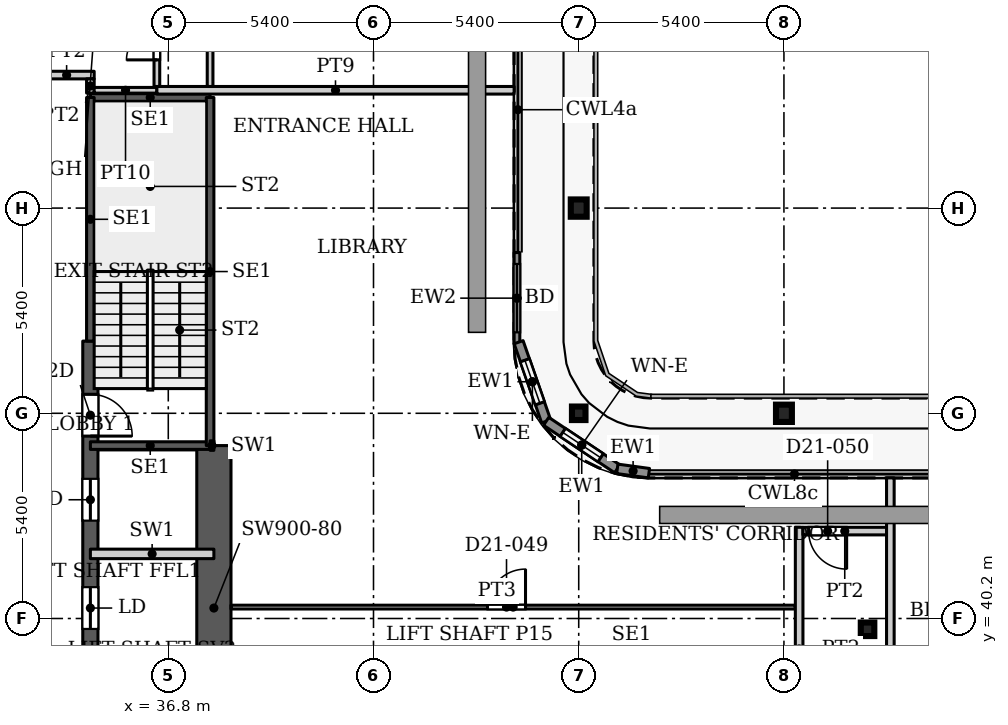
"""IFC4 building model, lengths in metres.
Left out: names, types, materials, properties, quantities, classifications, styles, units other than length and angle.
Written with IfcOpenShell. Run it as: python <this file> out.ifc"""

import sys

from ifc_helpers import new_model, si_unit, direction, frame, frame_2d, origin, origin_2d, place, context, subcontext, project, spatial, rectangle, hollow_rectangle, i_section, extrude, source, transform, mapped, element, fill, save


model = new_model("IFC4")
c1 = context("Model", 3, precision=1e-05, world=origin(), true_north=direction((0.0, 1.0)))
c2 = subcontext(c1, "Body", "Model", "MODEL_VIEW")
j1 = project(units=[si_unit("LENGTHUNIT", "METRE"), si_unit("PLANEANGLEUNIT", "RADIAN")], contexts=[c1])
p1 = place(None, origin())
s1 = spatial("IfcSite", under=j1, at=p1, CompositionType="ELEMENT")
p2 = place(p1, origin())
s2 = spatial("IfcBuilding", under=s1, at=p2, CompositionType="ELEMENT")
p3 = place(p2, frame((0.0, 0.0, 94.1)))
s3 = spatial("IfcBuildingStorey", under=s2, at=p3, CompositionType="ELEMENT", Elevation=94.1)
for number, where, z_axis, x_axis in (
    (1, (53.0, 45.6, 0.0), (0.0, 0.0, 1.0), (1.0, 0.0, 0.0)),
    (2, (47.6, 51.0, 0.0), (0.0, 0.0, 1.0), (1.0, 0.0, 0.0)),
):
    element("IfcColumn", number, at=place(p3, frame(where, z_axis=z_axis, x_axis=x_axis)), inside=s3, PredefinedType="COLUMN", context=c2, shape_type="SweptSolid", body=[
        extrude(i_section(OverallWidth=0.418, OverallDepth=0.455, WebThickness=0.042, FlangeThickness=0.068, FilletRadius=0.014, at=origin_2d()), origin(), (0.0, 0.0, 1.0), 3.9),
    ])
for number, where, z_axis, x_axis in (
    (3, (55.2, 39.916, 0.0), (0.0, 0.0, 1.0), (1.0, 0.0, 0.0)),
    (4, (47.6, 45.6, 0.0), (0.0, 0.0, 1.0), (1.0, 0.0, 0.0)),
):
    element("IfcColumn", number, at=place(p3, frame(where, z_axis=z_axis, x_axis=x_axis)), inside=s3, PredefinedType="COLUMN", context=c2, shape_type="SweptSolid", body=[
        extrude(hollow_rectangle(XDim=0.356, YDim=0.356, WallThickness=0.016, InnerFilletRadius=0.016, OuterFilletRadius=0.032, at=origin_2d()), origin(), (0.0, 0.0, 1.0), 3.9),
    ])
p4 = place(p3, frame((34.75, 29.05, 0.0), z_axis=(0.0, 0.0, 1.0), x_axis=(0.0, 1.0, 0.0)))
e5 = element("IfcWall", 5, at=p4, inside=s3, PredefinedType="SHEAR", context=c2, shape_type="SweptSolid", body=[
    extrude(rectangle(XDim=18.45, YDim=0.4, at=frame_2d((9.225, 0.0))), origin(), (0.0, 0.0, 1.0), 3.9),
])
p5 = place(p4, frame((8.025, 0.0, 0.0)))
e6 = element("IfcOpeningElement", 6, at=p5, cuts=e5, PredefinedType="OPENING", context=c2, shape_type="SweptSolid", body=[
    extrude(rectangle(XDim=1.1, YDim=2.2, at=frame_2d((0.55, 1.1))), frame((0.0, 0.21, 0.0), z_axis=(0.0, -1.0, 0.0), x_axis=(1.0, 0.0, 0.0)), (0.0, 0.0, 1.0), 0.42),
])
p6 = place(p4, frame((10.875, 0.0, 0.0)))
e7 = element("IfcOpeningElement", 7, at=p6, cuts=e5, PredefinedType="OPENING", context=c2, shape_type="SweptSolid", body=[
    extrude(rectangle(XDim=1.1, YDim=2.2, at=frame_2d((0.55, 1.1))), frame((0.0, 0.21, 0.0), z_axis=(0.0, -1.0, 0.0), x_axis=(1.0, 0.0, 0.0)), (0.0, 0.0, 1.0), 0.42),
])
p7 = place(p4, frame((13.725, 0.0, 0.0)))
e8 = element("IfcOpeningElement", 8, at=p7, cuts=e5, PredefinedType="OPENING", context=c2, shape_type="SweptSolid", body=[
    extrude(rectangle(XDim=1.1, YDim=2.2, at=frame_2d((0.55, 1.1))), frame((0.0, 0.21, 0.0), z_axis=(0.0, -1.0, 0.0), x_axis=(1.0, 0.0, 0.0)), (0.0, 0.0, 1.0), 0.42),
])
p8 = place(p4, frame((15.95, 0.0, 0.0)))
e9 = element("IfcOpeningElement", 9, at=p8, cuts=e5, PredefinedType="OPENING", context=c2, shape_type="SweptSolid", body=[
    extrude(rectangle(XDim=1.1, YDim=2.2, at=frame_2d((0.55, 1.1))), frame((0.0, 0.21, 0.0), z_axis=(0.0, -1.0, 0.0), x_axis=(1.0, 0.0, 0.0)), (0.0, 0.0, 1.0), 0.42),
])
p9 = place(p3, frame((38.0, 36.2, 0.0), z_axis=(0.0, 0.0, 1.0), x_axis=(0.0, 1.0, 0.0)))
e10 = element("IfcWall", 10, at=p9, inside=s3, PredefinedType="SHEAR", context=c2, shape_type="SweptSolid", body=[
    extrude(rectangle(XDim=8.55, YDim=0.9, at=frame_2d((4.275, 0.0))), origin(), (0.0, 0.0, 1.0), 3.9),
])
p10 = place(p3, frame((45.975, 49.83, 0.0), z_axis=(0.0, 0.0, 1.0), x_axis=(0.0, -1.0, 0.0)))
e11 = element("IfcWall", 11, at=p10, inside=s3, PredefinedType="SOLIDWALL", context=c2, shape_type="SweptSolid", body=[
    extrude(rectangle(XDim=2.4, YDim=0.15, at=frame_2d((1.2, 0.0))), origin(), (0.0, 0.0, 1.0), 3.75),
])
p11 = place(p10, frame((0.3, 0.0, 0.0)))
e12 = element("IfcOpeningElement", 12, at=p11, cuts=e11, PredefinedType="OPENING", context=c2, shape_type="SweptSolid", body=[
    extrude(rectangle(XDim=1.8, YDim=2.4, at=frame_2d((0.9, 1.2))), frame((0.0, 0.085, 0.0), z_axis=(0.0, -1.0, 0.0), x_axis=(1.0, 0.0, 0.0)), (0.0, 0.0, 1.0), 0.17),
])
p12 = place(p3, frame((46.018, 47.471, 0.0), z_axis=(0.0, 0.0, 1.0), x_axis=(0.328791208903, -0.944402637093, 0.0)))
e13 = element("IfcWall", 13, at=p12, inside=s3, PredefinedType="SOLIDWALL", context=c2, shape_type="SweptSolid", body=[
    extrude(rectangle(XDim=2.205, YDim=0.25, at=frame_2d((1.102, 0.0))), origin(), (0.0, 0.0, 1.0), 3.75),
])
p13 = place(p12, frame((0.503, 0.0, 0.6)))
e14 = element("IfcOpeningElement", 14, at=p13, cuts=e13, PredefinedType="OPENING", context=c2, shape_type="SweptSolid", body=[
    extrude(rectangle(XDim=1.2, YDim=2.1, at=frame_2d((0.6, 1.05))), frame((0.0, 0.135, 0.0), z_axis=(0.0, -1.0, 0.0), x_axis=(1.0, 0.0, 0.0)), (0.0, 0.0, 1.0), 0.27),
])
p14 = place(p3, frame((46.743, 45.389, 0.0), z_axis=(0.0, 0.0, 1.0), x_axis=(0.831449265529, -0.555600682912, 0.0)))
e15 = element("IfcWall", 15, at=p14, inside=s3, PredefinedType="SOLIDWALL", context=c2, shape_type="SweptSolid", body=[
    extrude(rectangle(XDim=2.251, YDim=0.25, at=frame_2d((1.126, 0.0))), origin(), (0.0, 0.0, 1.0), 3.75),
])
p15 = place(p14, frame((0.525, 0.0, 0.6)))
e16 = element("IfcOpeningElement", 16, at=p15, cuts=e15, PredefinedType="OPENING", context=c2, shape_type="SweptSolid", body=[
    extrude(rectangle(XDim=1.2, YDim=2.1, at=frame_2d((0.6, 1.05))), frame((0.0, 0.135, 0.0), z_axis=(0.0, -1.0, 0.0), x_axis=(1.0, 0.0, 0.0)), (0.0, 0.0, 1.0), 0.27),
])
p16 = place(p3, frame((48.615, 44.138, 0.0), z_axis=(0.0, 0.0, 1.0), x_axis=(0.990741504246, -0.135761819977, 0.0)))
e17 = element("IfcWall", 17, at=p16, inside=s3, PredefinedType="SOLIDWALL", context=c2, shape_type="SweptSolid", body=[
    extrude(rectangle(XDim=0.84, YDim=0.25, at=frame_2d((0.42, 0.0))), origin(), (0.0, 0.0, 1.0), 3.75),
])
for number, where, z_axis, x_axis in (
    (18, (34.75, 44.75, 0.0), (0.0, 0.0, 1.0), (1.0, 0.0, 0.0)),
    (19, (34.75, 53.91, 0.0), (0.0, 0.0, 1.0), (1.0, 0.0, 0.0)),
):
    element("IfcWall", number, at=place(p3, frame(where, z_axis=z_axis, x_axis=x_axis)), inside=s3, PredefinedType="SHEAR", context=c2, shape_type="SweptSolid", body=[
        extrude(rectangle(XDim=3.15, YDim=0.2, at=frame_2d((1.575, 0.0))), origin(), (0.0, 0.0, 1.0), 3.9),
    ])
p17 = place(p3, frame((34.75, 47.5, 0.0), z_axis=(0.0, 0.0, 1.0), x_axis=(0.0, 1.0, 0.0)))
e20 = element("IfcWall", 20, at=p17, inside=s3, PredefinedType="SHEAR", context=c2, shape_type="SweptSolid", body=[
    extrude(rectangle(XDim=6.41, YDim=0.2, at=frame_2d((3.205, 0.0))), origin(), (0.0, 0.0, 1.0), 3.9),
])
p18 = place(p3, frame((37.9, 44.75, 0.0), z_axis=(0.0, 0.0, 1.0), x_axis=(0.0, 1.0, 0.0)))
e21 = element("IfcWall", 21, at=p18, inside=s3, PredefinedType="SHEAR", context=c2, shape_type="SweptSolid", body=[
    extrude(rectangle(XDim=9.16, YDim=0.2, at=frame_2d((4.58, 0.0))), origin(), (0.0, 0.0, 1.0), 3.9),
])
p19 = place(p3, frame((34.75, 41.9, 0.0), z_axis=(0.0, 0.0, 1.0), x_axis=(1.0, 0.0, 0.0)))
e22 = element("IfcWall", 22, at=p19, inside=s3, PredefinedType="PARTITIONING", context=c2, shape_type="SweptSolid", body=[
    extrude(rectangle(XDim=3.25, YDim=0.25, at=frame_2d((1.625, 0.0))), origin(), (0.0, 0.0, 1.0), 3.9),
])
p20 = place(p3, frame((37.9, 44.75, 0.0), z_axis=(0.0, 0.0, 1.0), x_axis=(1.0, 0.0, 0.0)))
e23 = element("IfcWall", 23, at=p20, inside=s3, PredefinedType="PARTITIONING", context=c2, shape_type="SweptSolid", body=[
    extrude(rectangle(XDim=0.1, YDim=0.25, at=frame_2d((0.05, 0.0))), origin(), (0.0, 0.0, 1.0), 3.9),
])
p21 = place(p3, frame((33.4, 54.5, 0.0), z_axis=(0.0, 0.0, 1.0), x_axis=(1.0, 0.0, 0.0)))
e24 = element("IfcWall", 24, at=p21, inside=s3, PredefinedType="PARTITIONING", context=c2, shape_type="SweptSolid", body=[
    extrude(rectangle(XDim=1.45, YDim=0.2, at=frame_2d((0.725, 0.0))), origin(), (0.0, 0.0, 1.0), 3.6),
])
p22 = place(p3, frame((34.75, 54.025, 0.0), z_axis=(0.0, 0.0, 1.0), x_axis=(0.0, 1.0, 0.0)))
e25 = element("IfcWall", 25, at=p22, inside=s3, PredefinedType="PARTITIONING", context=c2, shape_type="SweptSolid", body=[
    extrude(rectangle(XDim=0.375, YDim=0.2, at=frame_2d((0.188, 0.0))), origin(), (0.0, 0.0, 1.0), 3.6),
])
p23 = place(p3, frame((34.85, 54.1, 0.0), z_axis=(0.0, 0.0, 1.0), x_axis=(1.0, 0.0, 0.0)))
e26 = element("IfcWall", 26, at=p23, inside=s3, PredefinedType="PARTITIONING", context=c2, shape_type="SweptSolid", body=[
    extrude(rectangle(XDim=1.65, YDim=0.15, at=frame_2d((0.825, 0.0))), origin(), (0.0, 0.0, 1.0), 3.6),
])
p24 = place(p3, frame((36.5, 54.1, 0.0), z_axis=(0.0, 0.0, 1.0), x_axis=(1.0, 0.0, 0.0)))
e27 = element("IfcWall", 27, at=p24, inside=s3, PredefinedType="PARTITIONING", context=c2, shape_type="SweptSolid", body=[
    extrude(rectangle(XDim=9.4, YDim=0.2, at=frame_2d((4.7, 0.0))), origin(), (0.0, 0.0, 1.0), 3.6),
])
p25 = place(p3, frame((36.5, 54.2, 0.0), z_axis=(0.0, 0.0, 1.0), x_axis=(0.0, 1.0, 0.0)))
e28 = element("IfcWall", 28, at=p25, inside=s3, PredefinedType="PARTITIONING", context=c2, shape_type="SweptSolid", body=[
    extrude(rectangle(XDim=5.35, YDim=0.15, at=frame_2d((2.675, 0.0))), origin(), (0.0, 0.0, 1.0), 3.6),
])
p26 = place(p25, frame((0.7, 0.0, 0.0)))
e29 = element("IfcOpeningElement", 29, at=p26, cuts=e28, PredefinedType="OPENING", context=c2, shape_type="SweptSolid", body=[
    extrude(rectangle(XDim=0.8, YDim=2.1, at=frame_2d((0.4, 1.05))), frame((0.0, 0.085, 0.0), z_axis=(0.0, -1.0, 0.0), x_axis=(1.0, 0.0, 0.0)), (0.0, 0.0, 1.0), 0.17),
])
p27 = place(p25, frame((3.35, 0.0, 0.0)))
e30 = element("IfcOpeningElement", 30, at=p27, cuts=e28, PredefinedType="OPENING", context=c2, shape_type="SweptSolid", body=[
    extrude(rectangle(XDim=0.9, YDim=2.1, at=frame_2d((0.45, 1.05))), frame((0.0, 0.085, 0.0), z_axis=(0.0, -1.0, 0.0), x_axis=(1.0, 0.0, 0.0)), (0.0, 0.0, 1.0), 0.17),
])
p28 = place(p3, frame((37.9, 54.2, 0.0), z_axis=(0.0, 0.0, 1.0), x_axis=(0.0, 1.0, 0.0)))
e31 = element("IfcWall", 31, at=p28, inside=s3, PredefinedType="PARTITIONING", context=c2, shape_type="SweptSolid", body=[
    extrude(rectangle(XDim=8.5, YDim=0.15, at=frame_2d((4.25, 0.0))), origin(), (0.0, 0.0, 1.0), 3.6),
])
p29 = place(p28, frame((1.1, 0.0, 0.0)))
e32 = element("IfcOpeningElement", 32, at=p29, cuts=e31, PredefinedType="OPENING", context=c2, shape_type="SweptSolid", body=[
    extrude(rectangle(XDim=0.9, YDim=2.1, at=frame_2d((0.45, 1.05))), frame((0.0, 0.085, 0.0), z_axis=(0.0, -1.0, 0.0), x_axis=(1.0, 0.0, 0.0)), (0.0, 0.0, 1.0), 0.17),
])
p30 = place(p28, frame((5.4, 0.0, 0.0)))
e33 = element("IfcOpeningElement", 33, at=p30, cuts=e31, PredefinedType="OPENING", context=c2, shape_type="SweptSolid", body=[
    extrude(rectangle(XDim=1.0, YDim=2.1, at=frame_2d((0.5, 1.05))), frame((0.0, 0.085, 0.0), z_axis=(0.0, -1.0, 0.0), x_axis=(1.0, 0.0, 0.0)), (0.0, 0.0, 1.0), 0.17),
])
p31 = place(p3, frame((38.449, 40.5, 0.0), z_axis=(0.0, 0.0, 1.0), x_axis=(1.0, 0.0, 0.0)))
e34 = element("IfcWall", 34, at=p31, inside=s3, PredefinedType="PARTITIONING", context=c2, shape_type="SweptSolid", body=[
    extrude(rectangle(XDim=14.851, YDim=0.1, at=frame_2d((7.426, 0.0))), origin(), (0.0, 0.0, 1.0), 3.6),
])
p32 = place(p31, frame((6.751, 0.0, 0.0)))
e35 = element("IfcOpeningElement", 35, at=p32, cuts=e34, PredefinedType="OPENING", context=c2, shape_type="SweptSolid", body=[
    extrude(rectangle(XDim=1.0, YDim=2.1, at=frame_2d((0.5, 1.05))), frame((0.0, 0.06, 0.0), z_axis=(0.0, -1.0, 0.0), x_axis=(1.0, 0.0, 0.0)), (0.0, 0.0, 1.0), 0.12),
])
p33 = place(p3, frame((53.4, 36.199, 0.0), z_axis=(0.0, 0.0, 1.0), x_axis=(0.0, 1.0, 0.0)))
e36 = element("IfcWall", 36, at=p33, inside=s3, PredefinedType="PARTITIONING", context=c2, shape_type="SweptSolid", body=[
    extrude(rectangle(XDim=6.401, YDim=0.2, at=frame_2d((3.201, 0.0))), origin(), (0.0, 0.0, 1.0), 3.6),
])
p34 = place(p3, frame((53.5, 42.5, 0.0), z_axis=(0.0, 0.0, 1.0), x_axis=(1.0, 0.0, 0.0)))
e37 = element("IfcWall", 37, at=p34, inside=s3, PredefinedType="PARTITIONING", context=c2, shape_type="SweptSolid", body=[
    extrude(rectangle(XDim=2.2, YDim=0.2, at=frame_2d((1.1, 0.0))), origin(), (0.0, 0.0, 1.0), 3.6),
])
p35 = place(p34, frame((0.15, 0.0, 0.0)))
e38 = element("IfcOpeningElement", 38, at=p35, cuts=e37, PredefinedType="OPENING", context=c2, shape_type="SweptSolid", body=[
    extrude(rectangle(XDim=1.0, YDim=2.1, at=frame_2d((0.5, 1.05))), frame((0.0, 0.11, 0.0), z_axis=(0.0, -1.0, 0.0), x_axis=(1.0, 0.0, 0.0)), (0.0, 0.0, 1.0), 0.22),
])
p36 = place(p3, frame((55.8, 30.4, 0.0), z_axis=(0.0, 0.0, 1.0), x_axis=(0.0, 1.0, 0.0)))
e39 = element("IfcWall", 39, at=p36, inside=s3, PredefinedType="PARTITIONING", context=c2, shape_type="SweptSolid", body=[
    extrude(rectangle(XDim=13.5, YDim=0.2, at=frame_2d((6.75, 0.0))), origin(), (0.0, 0.0, 1.0), 3.6),
])
m1 = source(origin(), c2, "Body", "SweptSolid", [
    extrude(rectangle(XDim=1.8, YDim=2.4, at=frame_2d((0.9, 1.2))), frame((0.0, 0.025, 0.0), z_axis=(0.0, -1.0, 0.0), x_axis=(1.0, 0.0, 0.0)), (0.0, 0.0, 1.0), 0.05),
])
p37 = place(p11, origin())
e40 = element("IfcDoor", 40, at=p37, inside=s3, OperationType="SLIDING_TO_LEFT", PredefinedType="DOOR", context=c2, shape_type="MappedRepresentation", body=[
    mapped(m1, transform((0.0, 0.0, 0.0), x_axis=(1.0, 0.0, 0.0), y_axis=(0.0, 1.0, 0.0), z_axis=(0.0, 0.0, 1.0), scale=1.0)),
])
fill(e12, e40)
m2 = source(origin(), c2, "Body", "SweptSolid", [
    extrude(rectangle(XDim=1.2, YDim=2.1, at=frame_2d((0.6, 1.05))), frame((0.0, 0.03, 0.0), z_axis=(0.0, -1.0, 0.0), x_axis=(1.0, 0.0, 0.0)), (0.0, 0.0, 1.0), 0.06),
])
p38 = place(p13, origin())
e41 = element("IfcWindow", 41, at=p38, inside=s3, PartitioningType="SINGLE_PANEL", PredefinedType="WINDOW", context=c2, shape_type="MappedRepresentation", body=[
    mapped(m2, transform((0.0, 0.0, 0.0), x_axis=(1.0, 0.0, 0.0), y_axis=(0.0, 1.0, 0.0), z_axis=(0.0, 0.0, 1.0), scale=1.0)),
])
fill(e14, e41)
p39 = place(p15, origin())
e42 = element("IfcWindow", 42, at=p39, inside=s3, PartitioningType="SINGLE_PANEL", PredefinedType="WINDOW", context=c2, shape_type="MappedRepresentation", body=[
    mapped(m2, transform((0.0, 0.0, 0.0), x_axis=(1.0, 0.0, 0.0), y_axis=(0.0, 1.0, 0.0), z_axis=(0.0, 0.0, 1.0), scale=1.0)),
])
fill(e16, e42)
m3 = source(origin(), c2, "Body", "SweptSolid", [
    extrude(rectangle(XDim=1.1, YDim=2.2, at=frame_2d((0.55, 1.1))), frame((0.0, 0.025, 0.0), z_axis=(0.0, -1.0, 0.0), x_axis=(1.0, 0.0, 0.0)), (0.0, 0.0, 1.0), 0.05),
])
p40 = place(p6, origin())
e43 = element("IfcDoor", 43, at=p40, inside=s3, OperationType="SLIDING_TO_LEFT", PredefinedType="DOOR", context=c2, shape_type="MappedRepresentation", body=[
    mapped(m3, transform((0.0, 0.0, 0.0), x_axis=(1.0, 0.0, 0.0), y_axis=(0.0, 1.0, 0.0), z_axis=(0.0, 0.0, 1.0), scale=1.0)),
])
fill(e7, e43)
p41 = place(p7, origin())
e44 = element("IfcDoor", 44, at=p41, inside=s3, OperationType="SLIDING_TO_LEFT", PredefinedType="DOOR", context=c2, shape_type="MappedRepresentation", body=[
    mapped(m3, transform((0.0, 0.0, 0.0), x_axis=(1.0, 0.0, 0.0), y_axis=(0.0, 1.0, 0.0), z_axis=(0.0, 0.0, 1.0), scale=1.0)),
])
fill(e8, e44)
m4 = source(origin(), c2, "Body", "SweptSolid", [
    extrude(rectangle(XDim=1.1, YDim=2.2, at=frame_2d((0.55, 1.1))), frame((0.0, 0.025, 0.0), z_axis=(0.0, -1.0, 0.0), x_axis=(1.0, 0.0, 0.0)), (0.0, 0.0, 1.0), 0.05),
])
p42 = place(p8, origin())
e45 = element("IfcDoor", 45, at=p42, inside=s3, OperationType="SINGLE_SWING_RIGHT", PredefinedType="DOOR", context=c2, shape_type="MappedRepresentation", body=[
    mapped(m4, transform((0.0, 0.0, 0.0), x_axis=(1.0, 0.0, 0.0), y_axis=(0.0, 1.0, 0.0), z_axis=(0.0, 0.0, 1.0), scale=1.0)),
])
fill(e9, e45)
m5 = source(origin(), c2, "Body", "SweptSolid", [
    extrude(rectangle(XDim=0.8, YDim=2.1, at=frame_2d((0.4, 1.05))), frame((0.0, 0.025, 0.0), z_axis=(0.0, -1.0, 0.0), x_axis=(1.0, 0.0, 0.0)), (0.0, 0.0, 1.0), 0.05),
])
p43 = place(p26, origin())
e46 = element("IfcDoor", 46, at=p43, inside=s3, OperationType="SINGLE_SWING_LEFT", PredefinedType="DOOR", context=c2, shape_type="MappedRepresentation", body=[
    mapped(m5, transform((0.0, 0.0, 0.0), x_axis=(1.0, 0.0, 0.0), y_axis=(0.0, 1.0, 0.0), z_axis=(0.0, 0.0, 1.0), scale=1.0)),
])
fill(e29, e46)
m6 = source(origin(), c2, "Body", "SweptSolid", [
    extrude(rectangle(XDim=1.0, YDim=2.1, at=frame_2d((0.5, 1.05))), frame((0.0, 0.025, 0.0), z_axis=(0.0, -1.0, 0.0), x_axis=(1.0, 0.0, 0.0)), (0.0, 0.0, 1.0), 0.05),
])
p44 = place(p32, origin())
e47 = element("IfcDoor", 47, at=p44, inside=s3, OperationType="SINGLE_SWING_LEFT", PredefinedType="DOOR", context=c2, shape_type="MappedRepresentation", body=[
    mapped(m6, transform((0.0, 0.0, 0.0), x_axis=(1.0, 0.0, 0.0), y_axis=(0.0, 1.0, 0.0), z_axis=(0.0, 0.0, 1.0), scale=1.0)),
])
fill(e35, e47)
m7 = source(origin(), c2, "Body", "SweptSolid", [
    extrude(rectangle(XDim=1.0, YDim=2.1, at=frame_2d((0.5, 1.05))), frame((0.0, 0.025, 0.0), z_axis=(0.0, -1.0, 0.0), x_axis=(1.0, 0.0, 0.0)), (0.0, 0.0, 1.0), 0.05),
])
p45 = place(p35, origin())
e48 = element("IfcDoor", 48, at=p45, inside=s3, OperationType="SINGLE_SWING_RIGHT", PredefinedType="DOOR", context=c2, shape_type="MappedRepresentation", body=[
    mapped(m7, transform((0.0, 0.0, 0.0), x_axis=(1.0, 0.0, 0.0), y_axis=(0.0, 1.0, 0.0), z_axis=(0.0, 0.0, 1.0), scale=1.0)),
])
fill(e38, e48)
save(model, sys.argv[1])
